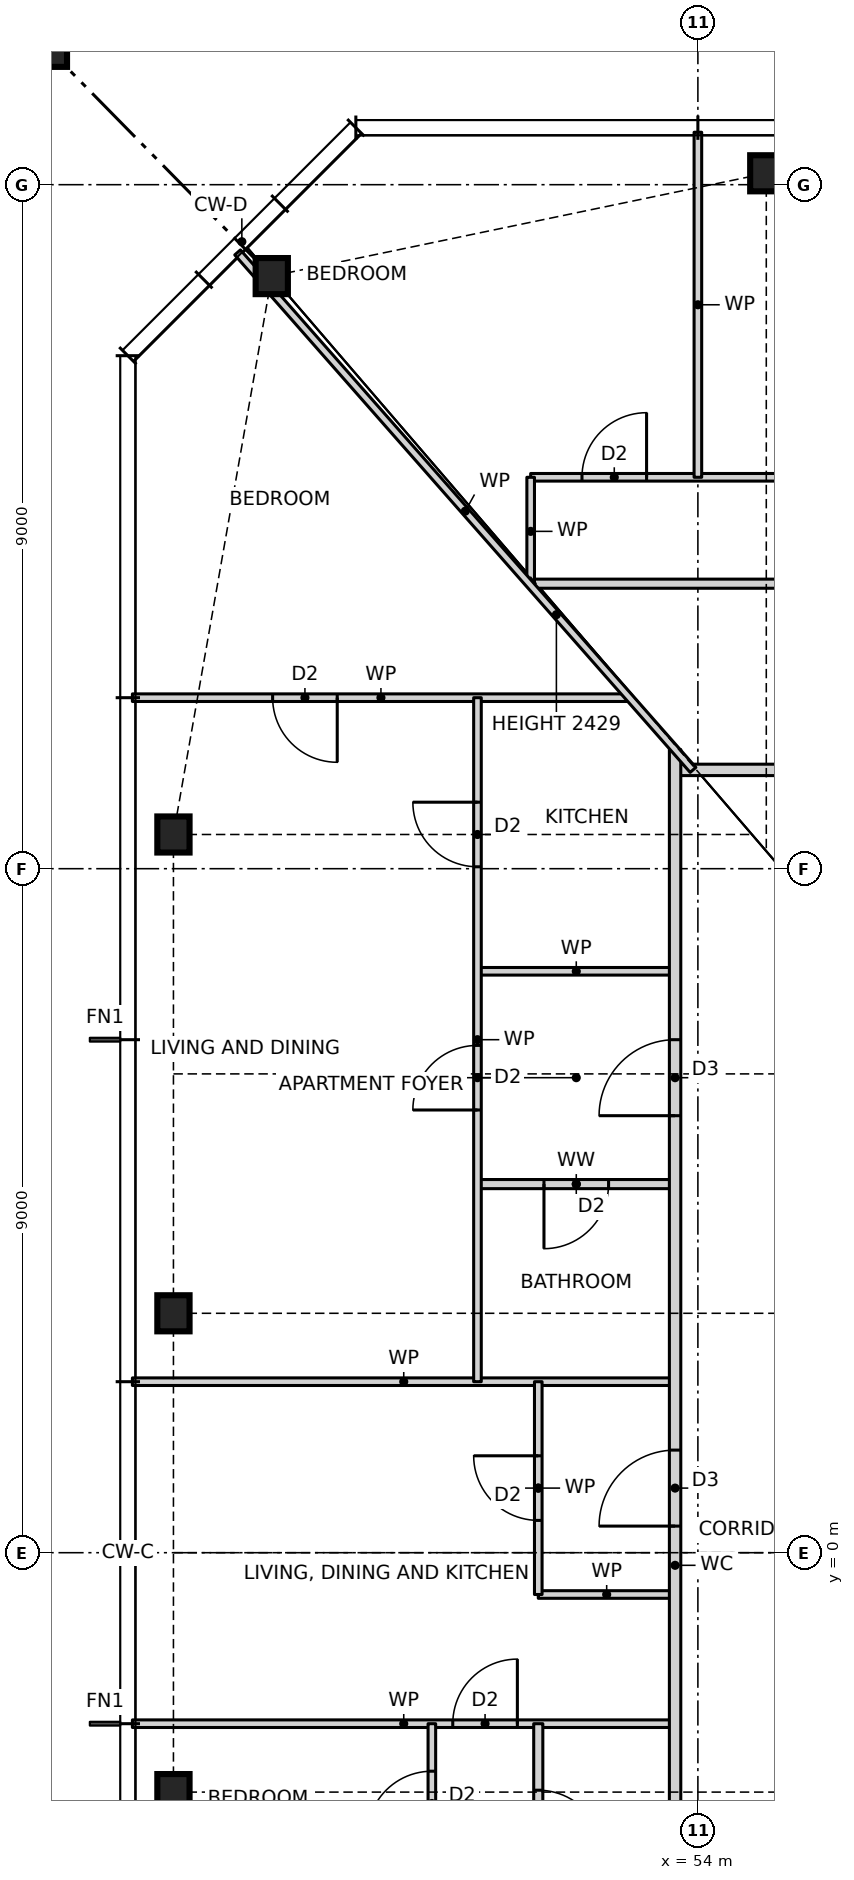
"""IFC4 building model, lengths in metres.
Left out: names, types, materials, properties, quantities, classifications, styles, units other than length and angle.
Written with IfcOpenShell. Run it as: python <this file> out.ifc"""

import sys

from ifc_helpers import new_model, si_unit, direction, frame, frame_2d, origin, origin_2d, place, context, subcontext, project, spatial, rectangle, hollow_rectangle, i_section, extrude, element, fill, save


model = new_model("IFC4")
c1 = context("Model", 3, precision=1e-05, world=origin(), true_north=direction((0.0, 1.0)))
c2 = subcontext(c1, "Body", "Model", "MODEL_VIEW")
j1 = project(units=[si_unit("LENGTHUNIT", "METRE"), si_unit("PLANEANGLEUNIT", "RADIAN")], contexts=[c1])
p1 = place(None, origin())
s1 = spatial("IfcSite", under=j1, at=p1, CompositionType="ELEMENT")
p2 = place(p1, origin())
s2 = spatial("IfcBuilding", under=s1, at=p2, CompositionType="ELEMENT")
p3 = place(p2, frame((0.0, 0.0, 64.0)))
s3 = spatial("IfcBuildingStorey", under=s2, at=p3, CompositionType="ELEMENT", Elevation=64.0)
for number, where, z_axis, x_axis in (
    (1, (54.9, 18.15, 0.0), (0.0, 0.0, 1.0), (1.0, 0.0, 0.0)),
    (2, (48.394, 16.797, 0.0), (0.0, 0.0, 1.0), (1.0, 0.0, 0.0)),
    (3, (47.1, 9.45, 0.0), (0.0, 0.0, 1.0), (1.0, 0.0, 0.0)),
    (4, (47.1, 3.15, 0.0), (0.0, 0.0, 1.0), (1.0, 0.0, 0.0)),
    (5, (47.1, -3.15, 0.0), (0.0, 0.0, 1.0), (1.0, 0.0, 0.0)),
):
    element("IfcColumn", number, at=place(p3, frame(where, z_axis=z_axis, x_axis=x_axis)), inside=s3, PredefinedType="COLUMN", context=c2, shape_type="SweptSolid", body=[
        extrude(i_section(OverallWidth=0.424, OverallDepth=0.475, WebThickness=0.048, FlangeThickness=0.077, at=origin_2d()), origin(), (0.0, 0.0, 1.0), 3.5),
    ])
p4 = place(p3, frame((45.1, 20.15, 0.0), z_axis=(0.0, 0.0, 1.0), x_axis=(1.0, 0.0, 0.0)))
e6 = element("IfcColumn", 6, at=p4, inside=s3, PredefinedType="COLUMN", context=c2, shape_type="SweptSolid", body=[
    extrude(hollow_rectangle(XDim=1.2, YDim=1.2, WallThickness=0.07, at=origin_2d()), origin(), (0.0, 0.0, 1.0), 3.5),
])
p5 = place(p3, frame((46.56, -2.25, 0.0), z_axis=(0.0, 0.0, 1.0), x_axis=(1.0, 0.0, 0.0)))
e7 = element("IfcWall", 7, at=p5, inside=s3, PredefinedType="PARTITIONING", context=c2, shape_type="SweptSolid", body=[
    extrude(rectangle(XDim=7.14, YDim=0.1, at=frame_2d((3.57, 0.0))), origin(), (0.0, 0.0, 1.0), 3.27),
])
p6 = place(p5, frame((4.215, 0.0, 0.0)))
e8 = element("IfcOpeningElement", 8, at=p6, cuts=e7, PredefinedType="OPENING", context=c2, shape_type="SweptSolid", body=[
    extrude(rectangle(XDim=0.85, YDim=2.1, at=frame_2d((0.425, 1.05))), frame((0.0, 0.06, 0.0), z_axis=(0.0, -1.0, 0.0), x_axis=(1.0, 0.0, 0.0)), (0.0, 0.0, 1.0), 0.12),
])
p7 = place(p3, frame((51.9, -0.55, 0.0), z_axis=(0.0, 0.0, 1.0), x_axis=(1.0, 0.0, 0.0)))
e9 = element("IfcWall", 9, at=p7, inside=s3, PredefinedType="PARTITIONING", context=c2, shape_type="SweptSolid", body=[
    extrude(rectangle(XDim=1.8, YDim=0.1, at=frame_2d((0.9, 0.0))), origin(), (0.0, 0.0, 1.0), 3.27),
])
p8 = place(p3, frame((46.56, 2.25, 0.0), z_axis=(0.0, 0.0, 1.0), x_axis=(1.0, 0.0, 0.0)))
e10 = element("IfcWall", 10, at=p8, inside=s3, PredefinedType="PARTITIONING", context=c2, shape_type="SweptSolid", body=[
    extrude(rectangle(XDim=7.14, YDim=0.1, at=frame_2d((3.57, 0.0))), origin(), (0.0, 0.0, 1.0), 3.27),
])
p9 = place(p3, frame((51.1, 4.85, 0.0), z_axis=(0.0, 0.0, 1.0), x_axis=(1.0, 0.0, 0.0)))
e11 = element("IfcWall", 11, at=p9, inside=s3, PredefinedType="PARTITIONING", context=c2, shape_type="SweptSolid", body=[
    extrude(rectangle(XDim=2.6, YDim=0.12, at=frame_2d((1.3, 0.0))), origin(), (0.0, 0.0, 1.0), 3.27),
])
p10 = place(p9, frame((0.875, 0.0, 0.0)))
e12 = element("IfcOpeningElement", 12, at=p10, cuts=e11, PredefinedType="OPENING", context=c2, shape_type="SweptSolid", body=[
    extrude(rectangle(XDim=0.85, YDim=2.1, at=frame_2d((0.425, 1.05))), frame((0.0, 0.07, 0.0), z_axis=(0.0, -1.0, 0.0), x_axis=(1.0, 0.0, 0.0)), (0.0, 0.0, 1.0), 0.14),
])
p11 = place(p3, frame((51.1, 7.65, 0.0), z_axis=(0.0, 0.0, 1.0), x_axis=(1.0, 0.0, 0.0)))
e13 = element("IfcWall", 13, at=p11, inside=s3, PredefinedType="PARTITIONING", context=c2, shape_type="SweptSolid", body=[
    extrude(rectangle(XDim=2.6, YDim=0.1, at=frame_2d((1.3, 0.0))), origin(), (0.0, 0.0, 1.0), 3.27),
])
p12 = place(p3, frame((53.7, 10.3, 0.0), z_axis=(0.0, 0.0, 1.0), x_axis=(1.0, 0.0, 0.0)))
e14 = element("IfcWall", 14, at=p12, inside=s3, PredefinedType="PARTITIONING", context=c2, shape_type="SweptSolid", body=[
    extrude(rectangle(XDim=18.6, YDim=0.15, at=frame_2d((9.3, 0.0))), origin(), (0.0, 0.0, 1.0), 3.27),
])
p13 = place(p12, frame((12.8, 0.0, 0.0)))
e15 = element("IfcOpeningElement", 15, at=p13, cuts=e14, PredefinedType="OPENING", context=c2, shape_type="SweptSolid", body=[
    extrude(rectangle(XDim=1.0, YDim=2.1, at=frame_2d((0.5, 1.05))), frame((0.0, 0.085, 0.0), z_axis=(0.0, -1.0, 0.0), x_axis=(1.0, 0.0, 0.0)), (0.0, 0.0, 1.0), 0.17),
])
p14 = place(p3, frame((46.56, 11.25, 0.0), z_axis=(0.0, 0.0, 1.0), x_axis=(1.0, 0.0, 0.0)))
e16 = element("IfcWall", 16, at=p14, inside=s3, PredefinedType="PARTITIONING", context=c2, shape_type="SweptSolid", body=[
    extrude(rectangle(XDim=6.54, YDim=0.1, at=frame_2d((3.27, 0.0))), origin(), (0.0, 0.0, 1.0), 3.27),
])
p15 = place(p14, frame((1.845, 0.0, 0.0)))
e17 = element("IfcOpeningElement", 17, at=p15, cuts=e16, PredefinedType="OPENING", context=c2, shape_type="SweptSolid", body=[
    extrude(rectangle(XDim=0.85, YDim=2.1, at=frame_2d((0.425, 1.05))), frame((0.0, 0.06, 0.0), z_axis=(0.0, -1.0, 0.0), x_axis=(1.0, 0.0, 0.0)), (0.0, 0.0, 1.0), 0.12),
])
p16 = place(p3, frame((51.8, 12.75, 0.0), z_axis=(0.0, 0.0, 1.0), x_axis=(1.0, 0.0, 0.0)))
e18 = element("IfcWall", 18, at=p16, inside=s3, PredefinedType="PARTITIONING", context=c2, shape_type="SweptSolid", body=[
    extrude(rectangle(XDim=20.2, YDim=0.12, at=frame_2d((10.1, 0.0))), origin(), (0.0, 0.0, 1.0), 3.27),
])
p17 = place(p16, frame((17.975, 0.0, 0.0)))
e19 = element("IfcOpeningElement", 19, at=p17, cuts=e18, PredefinedType="OPENING", context=c2, shape_type="SweptSolid", body=[
    extrude(rectangle(XDim=0.85, YDim=2.1, at=frame_2d((0.425, 1.05))), frame((0.0, 0.07, 0.0), z_axis=(0.0, -1.0, 0.0), x_axis=(1.0, 0.0, 0.0)), (0.0, 0.0, 1.0), 0.14),
])
p18 = place(p16, frame((14.775, 0.0, 0.0)))
e20 = element("IfcOpeningElement", 20, at=p18, cuts=e18, PredefinedType="OPENING", context=c2, shape_type="SweptSolid", body=[
    extrude(rectangle(XDim=0.85, YDim=2.1, at=frame_2d((0.425, 1.05))), frame((0.0, 0.07, 0.0), z_axis=(0.0, -1.0, 0.0), x_axis=(1.0, 0.0, 0.0)), (0.0, 0.0, 1.0), 0.14),
])
p19 = place(p16, frame((9.125, 0.0, 0.0)))
e21 = element("IfcOpeningElement", 21, at=p19, cuts=e18, PredefinedType="OPENING", context=c2, shape_type="SweptSolid", body=[
    extrude(rectangle(XDim=0.85, YDim=2.1, at=frame_2d((0.425, 1.05))), frame((0.0, 0.07, 0.0), z_axis=(0.0, -1.0, 0.0), x_axis=(1.0, 0.0, 0.0)), (0.0, 0.0, 1.0), 0.14),
])
p20 = place(p16, frame((3.525, 0.0, 0.0)))
e22 = element("IfcOpeningElement", 22, at=p20, cuts=e18, PredefinedType="OPENING", context=c2, shape_type="SweptSolid", body=[
    extrude(rectangle(XDim=0.85, YDim=2.1, at=frame_2d((0.425, 1.05))), frame((0.0, 0.07, 0.0), z_axis=(0.0, -1.0, 0.0), x_axis=(1.0, 0.0, 0.0)), (0.0, 0.0, 1.0), 0.14),
])
p21 = place(p3, frame((51.8, 14.15, 0.0), z_axis=(0.0, 0.0, 1.0), x_axis=(1.0, 0.0, 0.0)))
e23 = element("IfcWall", 23, at=p21, inside=s3, PredefinedType="PARTITIONING", context=c2, shape_type="SweptSolid", body=[
    extrude(rectangle(XDim=11.2, YDim=0.1, at=frame_2d((5.6, 0.0))), origin(), (0.0, 0.0, 1.0), 3.27),
])
p22 = place(p21, frame((8.525, 0.0, 0.0)))
e24 = element("IfcOpeningElement", 24, at=p22, cuts=e23, PredefinedType="OPENING", context=c2, shape_type="SweptSolid", body=[
    extrude(rectangle(XDim=0.85, YDim=2.1, at=frame_2d((0.425, 1.05))), frame((0.0, 0.06, 0.0), z_axis=(0.0, -1.0, 0.0), x_axis=(1.0, 0.0, 0.0)), (0.0, 0.0, 1.0), 0.12),
])
p23 = place(p21, frame((4.025, 0.0, 0.0)))
e25 = element("IfcOpeningElement", 25, at=p23, cuts=e23, PredefinedType="OPENING", context=c2, shape_type="SweptSolid", body=[
    extrude(rectangle(XDim=0.85, YDim=2.1, at=frame_2d((0.425, 1.05))), frame((0.0, 0.06, 0.0), z_axis=(0.0, -1.0, 0.0), x_axis=(1.0, 0.0, 0.0)), (0.0, 0.0, 1.0), 0.12),
])
p24 = place(p21, frame((0.675, 0.0, 0.0)))
e26 = element("IfcOpeningElement", 26, at=p24, cuts=e23, PredefinedType="OPENING", context=c2, shape_type="SweptSolid", body=[
    extrude(rectangle(XDim=0.85, YDim=2.1, at=frame_2d((0.425, 1.05))), frame((0.0, 0.06, 0.0), z_axis=(0.0, -1.0, 0.0), x_axis=(1.0, 0.0, 0.0)), (0.0, 0.0, 1.0), 0.12),
])
p25 = place(p3, frame((54.0, 14.15, 0.0), z_axis=(0.0, 0.0, 1.0), x_axis=(0.0, 1.0, 0.0)))
e27 = element("IfcWall", 27, at=p25, inside=s3, PredefinedType="PARTITIONING", context=c2, shape_type="SweptSolid", body=[
    extrude(rectangle(XDim=4.54, YDim=0.1, at=frame_2d((2.27, 0.0))), origin(), (0.0, 0.0, 1.0), 3.27),
])
p26 = place(p3, frame((53.7, -10.9, 0.0), z_axis=(0.0, 0.0, 1.0), x_axis=(0.0, 1.0, 0.0)))
e28 = element("IfcWall", 28, at=p26, inside=s3, PredefinedType="PARTITIONING", context=c2, shape_type="SweptSolid", body=[
    extrude(rectangle(XDim=21.468, YDim=0.15, at=frame_2d((10.734, 0.0))), origin(), (0.0, 0.0, 1.0), 3.27),
])
p27 = place(p26, frame((16.65, 0.0, 0.0)))
e29 = element("IfcOpeningElement", 29, at=p27, cuts=e28, PredefinedType="OPENING", context=c2, shape_type="SweptSolid", body=[
    extrude(rectangle(XDim=1.0, YDim=2.1, at=frame_2d((0.5, 1.05))), frame((0.0, 0.085, 0.0), z_axis=(0.0, -1.0, 0.0), x_axis=(1.0, 0.0, 0.0)), (0.0, 0.0, 1.0), 0.17),
])
p28 = place(p26, frame((11.25, 0.0, 0.0)))
e30 = element("IfcOpeningElement", 30, at=p28, cuts=e28, PredefinedType="OPENING", context=c2, shape_type="SweptSolid", body=[
    extrude(rectangle(XDim=1.0, YDim=2.1, at=frame_2d((0.5, 1.05))), frame((0.0, 0.085, 0.0), z_axis=(0.0, -1.0, 0.0), x_axis=(1.0, 0.0, 0.0)), (0.0, 0.0, 1.0), 0.17),
])
p29 = place(p3, frame((51.9, -12.614, 0.0), z_axis=(0.0, 0.0, 1.0), x_axis=(0.0, 1.0, 0.0)))
e31 = element("IfcWall", 31, at=p29, inside=s3, PredefinedType="PARTITIONING", context=c2, shape_type="SweptSolid", body=[
    extrude(rectangle(XDim=10.364, YDim=0.12, at=frame_2d((5.182, 0.0))), origin(), (0.0, 0.0, 1.0), 3.27),
])
p30 = place(p29, frame((8.639, 0.0, 0.0)))
e32 = element("IfcOpeningElement", 32, at=p30, cuts=e31, PredefinedType="OPENING", context=c2, shape_type="SweptSolid", body=[
    extrude(rectangle(XDim=0.85, YDim=2.1, at=frame_2d((0.425, 1.05))), frame((0.0, 0.07, 0.0), z_axis=(0.0, -1.0, 0.0), x_axis=(1.0, 0.0, 0.0)), (0.0, 0.0, 1.0), 0.14),
])
p31 = place(p29, frame((5.139, 0.0, 0.0)))
e33 = element("IfcOpeningElement", 33, at=p31, cuts=e31, PredefinedType="OPENING", context=c2, shape_type="SweptSolid", body=[
    extrude(rectangle(XDim=0.85, YDim=2.1, at=frame_2d((0.425, 1.05))), frame((0.0, 0.07, 0.0), z_axis=(0.0, -1.0, 0.0), x_axis=(1.0, 0.0, 0.0)), (0.0, 0.0, 1.0), 0.14),
])
p32 = place(p29, frame((1.257, 0.0, 0.0)))
e34 = element("IfcOpeningElement", 34, at=p32, cuts=e31, PredefinedType="OPENING", context=c2, shape_type="SweptSolid", body=[
    extrude(rectangle(XDim=0.85, YDim=2.1, at=frame_2d((0.425, 1.05))), frame((0.0, 0.07, 0.0), z_axis=(0.0, -1.0, 0.0), x_axis=(1.0, 0.0, 0.0)), (0.0, 0.0, 1.0), 0.14),
])
p33 = place(p3, frame((51.9, -0.55, 0.0), z_axis=(0.0, 0.0, 1.0), x_axis=(0.0, 1.0, 0.0)))
e35 = element("IfcWall", 35, at=p33, inside=s3, PredefinedType="PARTITIONING", context=c2, shape_type="SweptSolid", body=[
    extrude(rectangle(XDim=2.8, YDim=0.1, at=frame_2d((1.4, 0.0))), origin(), (0.0, 0.0, 1.0), 3.27),
])
p34 = place(p33, frame((0.975, 0.0, 0.0)))
e36 = element("IfcOpeningElement", 36, at=p34, cuts=e35, PredefinedType="OPENING", context=c2, shape_type="SweptSolid", body=[
    extrude(rectangle(XDim=0.85, YDim=2.1, at=frame_2d((0.425, 1.05))), frame((0.0, 0.06, 0.0), z_axis=(0.0, -1.0, 0.0), x_axis=(1.0, 0.0, 0.0)), (0.0, 0.0, 1.0), 0.12),
])
p35 = place(p3, frame((51.8, 12.727, 0.0), z_axis=(0.0, 0.0, 1.0), x_axis=(0.0, 1.0, 0.0)))
e37 = element("IfcWall", 37, at=p35, inside=s3, PredefinedType="PARTITIONING", context=c2, shape_type="SweptSolid", body=[
    extrude(rectangle(XDim=1.423, YDim=0.1, at=frame_2d((0.711, 0.0))), origin(), (0.0, 0.0, 1.0), 3.27),
])
p36 = place(p3, frame((51.1, 2.25, 0.0), z_axis=(0.0, 0.0, 1.0), x_axis=(0.0, 1.0, 0.0)))
e38 = element("IfcWall", 38, at=p36, inside=s3, PredefinedType="PARTITIONING", context=c2, shape_type="SweptSolid", body=[
    extrude(rectangle(XDim=9.0, YDim=0.1, at=frame_2d((4.5, 0.0))), origin(), (0.0, 0.0, 1.0), 3.27),
])
p37 = place(p36, frame((6.775, 0.0, 0.0)))
e39 = element("IfcOpeningElement", 39, at=p37, cuts=e38, PredefinedType="OPENING", context=c2, shape_type="SweptSolid", body=[
    extrude(rectangle(XDim=0.85, YDim=2.1, at=frame_2d((0.425, 1.05))), frame((0.0, 0.06, 0.0), z_axis=(0.0, -1.0, 0.0), x_axis=(1.0, 0.0, 0.0)), (0.0, 0.0, 1.0), 0.12),
])
p38 = place(p36, frame((3.575, 0.0, 0.0)))
e40 = element("IfcOpeningElement", 40, at=p38, cuts=e38, PredefinedType="OPENING", context=c2, shape_type="SweptSolid", body=[
    extrude(rectangle(XDim=0.85, YDim=2.1, at=frame_2d((0.425, 1.05))), frame((0.0, 0.06, 0.0), z_axis=(0.0, -1.0, 0.0), x_axis=(1.0, 0.0, 0.0)), (0.0, 0.0, 1.0), 0.12),
])
p39 = place(p3, frame((50.5, -13.45, 0.0), z_axis=(0.0, 0.0, 1.0), x_axis=(0.0, 1.0, 0.0)))
e41 = element("IfcWall", 41, at=p39, inside=s3, PredefinedType="PARTITIONING", context=c2, shape_type="SweptSolid", body=[
    extrude(rectangle(XDim=11.2, YDim=0.1, at=frame_2d((5.6, 0.0))), origin(), (0.0, 0.0, 1.0), 3.27),
])
p40 = place(p39, frame((9.725, 0.0, 0.0)))
e42 = element("IfcOpeningElement", 42, at=p40, cuts=e41, PredefinedType="OPENING", context=c2, shape_type="SweptSolid", body=[
    extrude(rectangle(XDim=0.85, YDim=2.1, at=frame_2d((0.425, 1.05))), frame((0.0, 0.06, 0.0), z_axis=(0.0, -1.0, 0.0), x_axis=(1.0, 0.0, 0.0)), (0.0, 0.0, 1.0), 0.12),
])
p41 = place(p39, frame((4.025, 0.0, 0.0)))
e43 = element("IfcOpeningElement", 43, at=p41, cuts=e41, PredefinedType="OPENING", context=c2, shape_type="SweptSolid", body=[
    extrude(rectangle(XDim=0.85, YDim=2.1, at=frame_2d((0.425, 1.05))), frame((0.0, 0.06, 0.0), z_axis=(0.0, -1.0, 0.0), x_axis=(1.0, 0.0, 0.0)), (0.0, 0.0, 1.0), 0.12),
])
p42 = place(p39, frame((0.675, 0.0, 0.0)))
e44 = element("IfcOpeningElement", 44, at=p42, cuts=e41, PredefinedType="OPENING", context=c2, shape_type="SweptSolid", body=[
    extrude(rectangle(XDim=0.85, YDim=2.1, at=frame_2d((0.425, 1.05))), frame((0.0, 0.06, 0.0), z_axis=(0.0, -1.0, 0.0), x_axis=(1.0, 0.0, 0.0)), (0.0, 0.0, 1.0), 0.12),
])
p43 = place(p3, frame((53.936, 10.3, 0.0), z_axis=(0.0, 0.0, 1.0), x_axis=(-0.660638210404, 0.750704439146, 0.0)))
e45 = element("IfcWall", 45, at=p43, inside=s3, PredefinedType="PARTITIONING", context=c2, shape_type="SweptSolid", body=[
    extrude(rectangle(XDim=9.07, YDim=0.1, at=frame_2d((4.535, 0.0))), origin(), (0.0, 0.0, 1.0), 2.429),
])
p44 = place(p24, origin())
e46 = element("IfcDoor", 46, at=p44, inside=s3, OperationType="SINGLE_SWING_RIGHT", PredefinedType="DOOR", context=c2, shape_type="SweptSolid", body=[
    extrude(rectangle(XDim=0.85, YDim=2.1, at=frame_2d((0.425, 1.05))), frame((0.0, 0.025, 0.0), z_axis=(0.0, -1.0, 0.0), x_axis=(1.0, 0.0, 0.0)), (0.0, 0.0, 1.0), 0.05),
])
fill(e26, e46)
p45 = place(p37, origin())
e47 = element("IfcDoor", 47, at=p45, inside=s3, OperationType="SINGLE_SWING_RIGHT", PredefinedType="DOOR", context=c2, shape_type="SweptSolid", body=[
    extrude(rectangle(XDim=0.85, YDim=2.1, at=frame_2d((0.425, 1.05))), frame((0.0, 0.025, 0.0), z_axis=(0.0, -1.0, 0.0), x_axis=(1.0, 0.0, 0.0)), (0.0, 0.0, 1.0), 0.05),
])
fill(e39, e47)
p46 = place(p27, origin())
e48 = element("IfcDoor", 48, at=p46, inside=s3, OperationType="SINGLE_SWING_LEFT", PredefinedType="DOOR", context=c2, shape_type="SweptSolid", body=[
    extrude(rectangle(XDim=1.0, YDim=2.1, at=frame_2d((0.5, 1.05))), frame((0.0, 0.025, 0.0), z_axis=(0.0, -1.0, 0.0), x_axis=(1.0, 0.0, 0.0)), (0.0, 0.0, 1.0), 0.05),
])
fill(e29, e48)
p47 = place(p38, origin())
e49 = element("IfcDoor", 49, at=p47, inside=s3, OperationType="SINGLE_SWING_LEFT", PredefinedType="DOOR", context=c2, shape_type="SweptSolid", body=[
    extrude(rectangle(XDim=0.85, YDim=2.1, at=frame_2d((0.425, 1.05))), frame((0.0, 0.025, 0.0), z_axis=(0.0, -1.0, 0.0), x_axis=(1.0, 0.0, 0.0)), (0.0, 0.0, 1.0), 0.05),
])
fill(e40, e49)
p48 = place(p10, frame((0.85, 0.0, 0.0), z_axis=(0.0, 0.0, 1.0), x_axis=(-1.0, 0.0, 0.0)))
e50 = element("IfcDoor", 50, at=p48, inside=s3, OperationType="SINGLE_SWING_RIGHT", PredefinedType="DOOR", context=c2, shape_type="SweptSolid", body=[
    extrude(rectangle(XDim=0.85, YDim=2.1, at=frame_2d((0.425, 1.05))), frame((0.0, 0.025, 0.0), z_axis=(0.0, -1.0, 0.0), x_axis=(1.0, 0.0, 0.0)), (0.0, 0.0, 1.0), 0.05),
])
fill(e12, e50)
p49 = place(p15, frame((0.85, 0.0, 0.0), z_axis=(0.0, 0.0, 1.0), x_axis=(-1.0, 0.0, 0.0)))
e51 = element("IfcDoor", 51, at=p49, inside=s3, OperationType="SINGLE_SWING_LEFT", PredefinedType="DOOR", context=c2, shape_type="SweptSolid", body=[
    extrude(rectangle(XDim=0.85, YDim=2.1, at=frame_2d((0.425, 1.05))), frame((0.0, 0.025, 0.0), z_axis=(0.0, -1.0, 0.0), x_axis=(1.0, 0.0, 0.0)), (0.0, 0.0, 1.0), 0.05),
])
fill(e17, e51)
p50 = place(p28, origin())
e52 = element("IfcDoor", 52, at=p50, inside=s3, OperationType="SINGLE_SWING_LEFT", PredefinedType="DOOR", context=c2, shape_type="SweptSolid", body=[
    extrude(rectangle(XDim=1.0, YDim=2.1, at=frame_2d((0.5, 1.05))), frame((0.0, 0.025, 0.0), z_axis=(0.0, -1.0, 0.0), x_axis=(1.0, 0.0, 0.0)), (0.0, 0.0, 1.0), 0.05),
])
fill(e30, e52)
p51 = place(p34, origin())
e53 = element("IfcDoor", 53, at=p51, inside=s3, OperationType="SINGLE_SWING_RIGHT", PredefinedType="DOOR", context=c2, shape_type="SweptSolid", body=[
    extrude(rectangle(XDim=0.85, YDim=2.1, at=frame_2d((0.425, 1.05))), frame((0.0, 0.025, 0.0), z_axis=(0.0, -1.0, 0.0), x_axis=(1.0, 0.0, 0.0)), (0.0, 0.0, 1.0), 0.05),
])
fill(e36, e53)
p52 = place(p6, origin())
e54 = element("IfcDoor", 54, at=p52, inside=s3, OperationType="SINGLE_SWING_RIGHT", PredefinedType="DOOR", context=c2, shape_type="SweptSolid", body=[
    extrude(rectangle(XDim=0.85, YDim=2.1, at=frame_2d((0.425, 1.05))), frame((0.0, 0.025, 0.0), z_axis=(0.0, -1.0, 0.0), x_axis=(1.0, 0.0, 0.0)), (0.0, 0.0, 1.0), 0.05),
])
fill(e8, e54)
p53 = place(p40, origin())
e55 = element("IfcDoor", 55, at=p53, inside=s3, OperationType="SINGLE_SWING_LEFT", PredefinedType="DOOR", context=c2, shape_type="SweptSolid", body=[
    extrude(rectangle(XDim=0.85, YDim=2.1, at=frame_2d((0.425, 1.05))), frame((0.0, 0.025, 0.0), z_axis=(0.0, -1.0, 0.0), x_axis=(1.0, 0.0, 0.0)), (0.0, 0.0, 1.0), 0.05),
])
fill(e42, e55)
p54 = place(p30, frame((0.85, 0.0, 0.0), z_axis=(0.0, 0.0, 1.0), x_axis=(-1.0, 0.0, 0.0)))
e56 = element("IfcDoor", 56, at=p54, inside=s3, OperationType="SINGLE_SWING_RIGHT", PredefinedType="DOOR", context=c2, shape_type="SweptSolid", body=[
    extrude(rectangle(XDim=0.85, YDim=2.1, at=frame_2d((0.425, 1.05))), frame((0.0, 0.025, 0.0), z_axis=(0.0, -1.0, 0.0), x_axis=(1.0, 0.0, 0.0)), (0.0, 0.0, 1.0), 0.05),
])
fill(e32, e56)
save(model, sys.argv[1])
